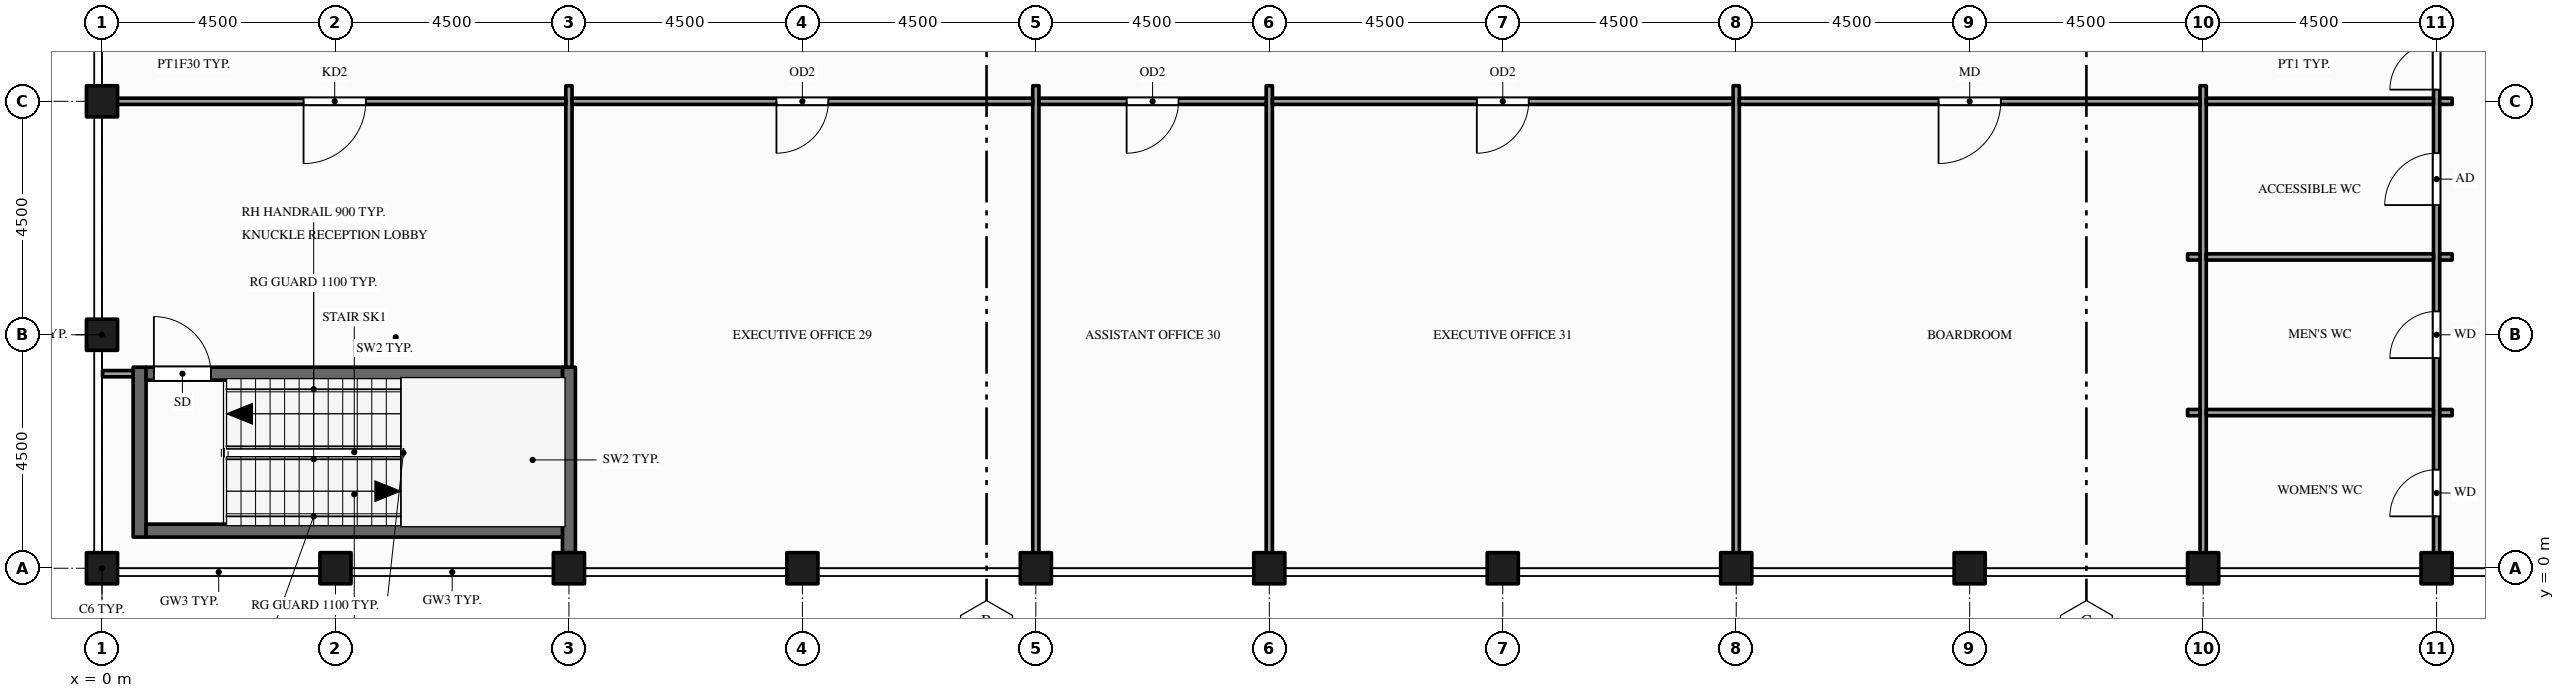
"""IFC4 building model, lengths in metres.
Left out: names, types, materials, properties, quantities, classifications, styles, units other than length and angle.
Written with IfcOpenShell. Run it as: python <this file> out.ifc"""

import sys

from ifc_helpers import new_model, si_unit, direction, frame, frame_2d, origin, origin_2d, place, context, subcontext, project, spatial, rectangle, hollow_rectangle, extrude, element, fill, save


model = new_model("IFC4")
c1 = context("Model", 3, precision=1e-05, world=origin(), true_north=direction((0.0, 1.0)))
c2 = subcontext(c1, "Body", "Model", "MODEL_VIEW")
j1 = project(units=[si_unit("LENGTHUNIT", "METRE"), si_unit("PLANEANGLEUNIT", "RADIAN")], contexts=[c1])
p1 = place(None, origin())
s1 = spatial("IfcSite", under=j1, at=p1, CompositionType="ELEMENT")
p2 = place(p1, origin())
s2 = spatial("IfcBuilding", under=s1, at=p2, CompositionType="ELEMENT")
p3 = place(p2, frame((0.0, 0.0, 314.0)))
s3 = spatial("IfcBuildingStorey", under=s2, at=p3, CompositionType="ELEMENT", Elevation=314.0)
for number, where, z_axis, x_axis in (
    (1, (0.0, 0.0, -0.15), (0.0, 0.0, 1.0), (1.0, 0.0, 0.0)),
    (2, (0.0, 4.5, -0.15), (0.0, 0.0, 1.0), (1.0, 0.0, 0.0)),
    (3, (0.0, 9.0, -0.15), (0.0, 0.0, 1.0), (1.0, 0.0, 0.0)),
    (4, (4.5, 0.0, -0.15), (0.0, 0.0, 1.0), (1.0, 0.0, 0.0)),
    (5, (9.0, 0.0, -0.15), (0.0, 0.0, 1.0), (1.0, 0.0, 0.0)),
    (6, (13.5, 0.0, -0.15), (0.0, 0.0, 1.0), (1.0, 0.0, 0.0)),
    (7, (18.0, 0.0, -0.15), (0.0, 0.0, 1.0), (1.0, 0.0, 0.0)),
    (8, (22.5, 0.0, -0.15), (0.0, 0.0, 1.0), (1.0, 0.0, 0.0)),
    (9, (27.0, 0.0, -0.15), (0.0, 0.0, 1.0), (1.0, 0.0, 0.0)),
    (10, (31.5, 0.0, -0.15), (0.0, 0.0, 1.0), (1.0, 0.0, 0.0)),
    (11, (36.0, 0.0, -0.15), (0.0, 0.0, 1.0), (1.0, 0.0, 0.0)),
    (12, (40.5, 0.0, -0.15), (0.0, 0.0, 1.0), (1.0, 0.0, 0.0)),
    (13, (45.0, 0.0, -0.15), (0.0, 0.0, 1.0), (1.0, 0.0, 0.0)),
):
    element("IfcColumn", number, at=place(p3, frame(where, z_axis=z_axis, x_axis=x_axis)), inside=s3, PredefinedType="COLUMN", context=c2, shape_type="SweptSolid", body=[
        extrude(hollow_rectangle(XDim=0.6, YDim=0.6, WallThickness=0.03, at=origin_2d()), origin(), (0.0, 0.0, 1.0), 4.5),
    ])
p4 = place(p3, frame((0.725, 0.6, 0.0), z_axis=(0.0, 0.0, 1.0), x_axis=(0.0, 1.0, 0.0)))
e14 = element("IfcWall", 14, at=p4, inside=s3, PredefinedType="SHEAR", context=c2, shape_type="SweptSolid", body=[
    extrude(rectangle(XDim=3.275, YDim=0.25, at=frame_2d((1.637, 0.0))), origin(), (0.0, 0.0, 1.0), 4.35),
])
p5 = place(p3, frame((9.0, 0.3, 0.0), z_axis=(0.0, 0.0, 1.0), x_axis=(0.0, 1.0, 0.0)))
e15 = element("IfcWall", 15, at=p5, inside=s3, PredefinedType="SHEAR", context=c2, shape_type="SweptSolid", body=[
    extrude(rectangle(XDim=3.575, YDim=0.25, at=frame_2d((1.788, 0.0))), origin(), (0.0, 0.0, 1.0), 4.35),
])
p6 = place(p3, frame((9.0, 3.875, 0.0), z_axis=(0.0, 0.0, 1.0), x_axis=(0.0, 1.0, 0.0)))
e16 = element("IfcWall", 16, at=p6, inside=s3, PredefinedType="PARTITIONING", context=c2, shape_type="SweptSolid", body=[
    extrude(rectangle(XDim=5.425, YDim=0.12, at=frame_2d((2.712, 0.0))), origin(), (0.0, 0.0, 1.0), 3.359),
])
for number, where, z_axis, x_axis in (
    (17, (18.0, 0.01, 0.0), (0.0, 0.0, 1.0), (0.0, 1.0, 0.0)),
    (18, (22.5, 0.01, 0.0), (0.0, 0.0, 1.0), (0.0, 1.0, 0.0)),
    (19, (31.5, 0.01, 0.0), (0.0, 0.0, 1.0), (0.0, 1.0, 0.0)),
    (20, (40.5, 0.01, 0.0), (0.0, 0.0, 1.0), (0.0, 1.0, 0.0)),
):
    element("IfcWall", number, at=place(p3, frame(where, z_axis=z_axis, x_axis=x_axis)), inside=s3, PredefinedType="PARTITIONING", context=c2, shape_type="SweptSolid", body=[
        extrude(rectangle(XDim=9.29, YDim=0.12, at=frame_2d((4.645, 0.0))), origin(), (0.0, 0.0, 1.0), 3.359),
    ])
p7 = place(p3, frame((45.0, 0.01, 0.0), z_axis=(0.0, 0.0, 1.0), x_axis=(0.0, 1.0, 0.0)))
e21 = element("IfcWall", 21, at=p7, inside=s3, PredefinedType="PARTITIONING", context=c2, shape_type="SweptSolid", body=[
    extrude(rectangle(XDim=22.48, YDim=0.12, at=frame_2d((11.24, 0.0))), origin(), (0.0, 0.0, 1.0), 3.359),
])
p8 = place(p7, frame((9.215, 0.0, 0.0)))
e22 = element("IfcOpeningElement", 22, at=p8, cuts=e21, PredefinedType="OPENING", context=c2, shape_type="SweptSolid", body=[
    extrude(rectangle(XDim=1.8, YDim=2.1, at=frame_2d((0.9, 1.05))), frame((0.0, 0.07, 0.0), z_axis=(0.0, -1.0, 0.0), x_axis=(1.0, 0.0, 0.0)), (0.0, 0.0, 1.0), 0.14),
])
p9 = place(p7, frame((0.99, 0.0, 0.0)))
e23 = element("IfcOpeningElement", 23, at=p9, cuts=e21, PredefinedType="OPENING", context=c2, shape_type="SweptSolid", body=[
    extrude(rectangle(XDim=0.9, YDim=2.1, at=frame_2d((0.45, 1.05))), frame((0.0, 0.07, 0.0), z_axis=(0.0, -1.0, 0.0), x_axis=(1.0, 0.0, 0.0)), (0.0, 0.0, 1.0), 0.14),
])
p10 = place(p7, frame((4.04, 0.0, 0.0)))
e24 = element("IfcOpeningElement", 24, at=p10, cuts=e21, PredefinedType="OPENING", context=c2, shape_type="SweptSolid", body=[
    extrude(rectangle(XDim=0.9, YDim=2.1, at=frame_2d((0.45, 1.05))), frame((0.0, 0.07, 0.0), z_axis=(0.0, -1.0, 0.0), x_axis=(1.0, 0.0, 0.0)), (0.0, 0.0, 1.0), 0.14),
])
p11 = place(p7, frame((6.99, 0.0, 0.0)))
e25 = element("IfcOpeningElement", 25, at=p11, cuts=e21, PredefinedType="OPENING", context=c2, shape_type="SweptSolid", body=[
    extrude(rectangle(XDim=1.0, YDim=2.1, at=frame_2d((0.5, 1.05))), frame((0.0, 0.07, 0.0), z_axis=(0.0, -1.0, 0.0), x_axis=(1.0, 0.0, 0.0)), (0.0, 0.0, 1.0), 0.14),
])
p12 = place(p3, frame((0.85, 0.725, 0.0), z_axis=(0.0, 0.0, 1.0), x_axis=(1.0, 0.0, 0.0)))
e26 = element("IfcWall", 26, at=p12, inside=s3, PredefinedType="SHEAR", context=c2, shape_type="SweptSolid", body=[
    extrude(rectangle(XDim=8.025, YDim=0.25, at=frame_2d((4.012, 0.0))), origin(), (0.0, 0.0, 1.0), 4.35),
])
p13 = place(p3, frame((40.2, 3.0, 0.0), z_axis=(0.0, 0.0, 1.0), x_axis=(1.0, 0.0, 0.0)))
e27 = element("IfcWall", 27, at=p13, inside=s3, PredefinedType="PARTITIONING", context=c2, shape_type="SweptSolid", body=[
    extrude(rectangle(XDim=0.24, YDim=0.12, at=frame_2d((0.12, 0.0))), origin(), (0.0, 0.0, 1.0), 3.359),
])
p14 = place(p3, frame((40.56, 3.0, 0.0), z_axis=(0.0, 0.0, 1.0), x_axis=(1.0, 0.0, 0.0)))
e28 = element("IfcWall", 28, at=p14, inside=s3, PredefinedType="PARTITIONING", context=c2, shape_type="SweptSolid", body=[
    extrude(rectangle(XDim=4.38, YDim=0.12, at=frame_2d((2.19, 0.0))), origin(), (0.0, 0.0, 1.0), 3.359),
])
p15 = place(p3, frame((45.06, 3.0, 0.0), z_axis=(0.0, 0.0, 1.0), x_axis=(1.0, 0.0, 0.0)))
e29 = element("IfcWall", 29, at=p15, inside=s3, PredefinedType="PARTITIONING", context=c2, shape_type="SweptSolid", body=[
    extrude(rectangle(XDim=0.24, YDim=0.12, at=frame_2d((0.12, 0.0))), origin(), (0.0, 0.0, 1.0), 3.359),
])
p16 = place(p3, frame((0.01, 3.75, 0.0), z_axis=(0.0, 0.0, 1.0), x_axis=(1.0, 0.0, 0.0)))
e30 = element("IfcWall", 30, at=p16, inside=s3, PredefinedType="PARTITIONING", context=c2, shape_type="SweptSolid", body=[
    extrude(rectangle(XDim=0.59, YDim=0.12, at=frame_2d((0.295, 0.0))), origin(), (0.0, 0.0, 1.0), 3.672),
])
p17 = place(p3, frame((0.85, 3.75, 0.0), z_axis=(0.0, 0.0, 1.0), x_axis=(1.0, 0.0, 0.0)))
e31 = element("IfcWall", 31, at=p17, inside=s3, PredefinedType="SHEAR", context=c2, shape_type="SweptSolid", body=[
    extrude(rectangle(XDim=8.025, YDim=0.25, at=frame_2d((4.012, 0.0))), origin(), (0.0, 0.0, 1.0), 4.35),
])
p18 = place(p17, frame((0.15, 0.0, 0.0)))
e32 = element("IfcOpeningElement", 32, at=p18, cuts=e31, PredefinedType="OPENING", context=c2, shape_type="SweptSolid", body=[
    extrude(rectangle(XDim=1.1, YDim=2.1, at=frame_2d((0.55, 1.05))), frame((0.0, 0.135, 0.0), z_axis=(0.0, -1.0, 0.0), x_axis=(1.0, 0.0, 0.0)), (0.0, 0.0, 1.0), 0.27),
])
p19 = place(p3, frame((40.2, 6.0, 0.0), z_axis=(0.0, 0.0, 1.0), x_axis=(1.0, 0.0, 0.0)))
e33 = element("IfcWall", 33, at=p19, inside=s3, PredefinedType="PARTITIONING", context=c2, shape_type="SweptSolid", body=[
    extrude(rectangle(XDim=0.24, YDim=0.12, at=frame_2d((0.12, 0.0))), origin(), (0.0, 0.0, 1.0), 3.359),
])
p20 = place(p3, frame((40.56, 6.0, 0.0), z_axis=(0.0, 0.0, 1.0), x_axis=(1.0, 0.0, 0.0)))
e34 = element("IfcWall", 34, at=p20, inside=s3, PredefinedType="PARTITIONING", context=c2, shape_type="SweptSolid", body=[
    extrude(rectangle(XDim=4.38, YDim=0.12, at=frame_2d((2.19, 0.0))), origin(), (0.0, 0.0, 1.0), 3.359),
])
p21 = place(p3, frame((45.06, 6.0, 0.0), z_axis=(0.0, 0.0, 1.0), x_axis=(1.0, 0.0, 0.0)))
e35 = element("IfcWall", 35, at=p21, inside=s3, PredefinedType="PARTITIONING", context=c2, shape_type="SweptSolid", body=[
    extrude(rectangle(XDim=0.24, YDim=0.12, at=frame_2d((0.12, 0.0))), origin(), (0.0, 0.0, 1.0), 3.359),
])
p22 = place(p3, frame((0.01, 9.0, 0.0), z_axis=(0.0, 0.0, 1.0), x_axis=(1.0, 0.0, 0.0)))
e36 = element("IfcWall", 36, at=p22, inside=s3, PredefinedType="PARTITIONING", context=c2, shape_type="SweptSolid", body=[
    extrude(rectangle(XDim=8.93, YDim=0.12, at=frame_2d((4.465, 0.0))), origin(), (0.0, 0.0, 1.0), 3.359),
])
p23 = place(p22, frame((3.875, 0.0, 0.0)))
e37 = element("IfcOpeningElement", 37, at=p23, cuts=e36, PredefinedType="OPENING", context=c2, shape_type="SweptSolid", body=[
    extrude(rectangle(XDim=1.2, YDim=2.1, at=frame_2d((0.6, 1.05))), frame((0.0, 0.07, 0.0), z_axis=(0.0, -1.0, 0.0), x_axis=(1.0, 0.0, 0.0)), (0.0, 0.0, 1.0), 0.14),
])
p24 = place(p3, frame((9.06, 9.0, 0.0), z_axis=(0.0, 0.0, 1.0), x_axis=(1.0, 0.0, 0.0)))
e38 = element("IfcWall", 38, at=p24, inside=s3, PredefinedType="PARTITIONING", context=c2, shape_type="SweptSolid", body=[
    extrude(rectangle(XDim=8.88, YDim=0.12, at=frame_2d((4.44, 0.0))), origin(), (0.0, 0.0, 1.0), 3.359),
])
p25 = place(p24, frame((3.94, 0.0, 0.0)))
e39 = element("IfcOpeningElement", 39, at=p25, cuts=e38, PredefinedType="OPENING", context=c2, shape_type="SweptSolid", body=[
    extrude(rectangle(XDim=1.0, YDim=2.1, at=frame_2d((0.5, 1.05))), frame((0.0, 0.07, 0.0), z_axis=(0.0, -1.0, 0.0), x_axis=(1.0, 0.0, 0.0)), (0.0, 0.0, 1.0), 0.14),
])
p26 = place(p3, frame((18.06, 9.0, 0.0), z_axis=(0.0, 0.0, 1.0), x_axis=(1.0, 0.0, 0.0)))
e40 = element("IfcWall", 40, at=p26, inside=s3, PredefinedType="PARTITIONING", context=c2, shape_type="SweptSolid", body=[
    extrude(rectangle(XDim=4.38, YDim=0.12, at=frame_2d((2.19, 0.0))), origin(), (0.0, 0.0, 1.0), 3.359),
])
p27 = place(p26, frame((1.69, 0.0, 0.0)))
e41 = element("IfcOpeningElement", 41, at=p27, cuts=e40, PredefinedType="OPENING", context=c2, shape_type="SweptSolid", body=[
    extrude(rectangle(XDim=1.0, YDim=2.1, at=frame_2d((0.5, 1.05))), frame((0.0, 0.07, 0.0), z_axis=(0.0, -1.0, 0.0), x_axis=(1.0, 0.0, 0.0)), (0.0, 0.0, 1.0), 0.14),
])
p28 = place(p3, frame((22.56, 9.0, 0.0), z_axis=(0.0, 0.0, 1.0), x_axis=(1.0, 0.0, 0.0)))
e42 = element("IfcWall", 42, at=p28, inside=s3, PredefinedType="PARTITIONING", context=c2, shape_type="SweptSolid", body=[
    extrude(rectangle(XDim=8.88, YDim=0.12, at=frame_2d((4.44, 0.0))), origin(), (0.0, 0.0, 1.0), 3.359),
])
p29 = place(p28, frame((3.94, 0.0, 0.0)))
e43 = element("IfcOpeningElement", 43, at=p29, cuts=e42, PredefinedType="OPENING", context=c2, shape_type="SweptSolid", body=[
    extrude(rectangle(XDim=1.0, YDim=2.1, at=frame_2d((0.5, 1.05))), frame((0.0, 0.07, 0.0), z_axis=(0.0, -1.0, 0.0), x_axis=(1.0, 0.0, 0.0)), (0.0, 0.0, 1.0), 0.14),
])
p30 = place(p3, frame((31.56, 9.0, 0.0), z_axis=(0.0, 0.0, 1.0), x_axis=(1.0, 0.0, 0.0)))
e44 = element("IfcWall", 44, at=p30, inside=s3, PredefinedType="PARTITIONING", context=c2, shape_type="SweptSolid", body=[
    extrude(rectangle(XDim=8.88, YDim=0.12, at=frame_2d((4.44, 0.0))), origin(), (0.0, 0.0, 1.0), 3.359),
])
p31 = place(p30, frame((3.84, 0.0, 0.0)))
e45 = element("IfcOpeningElement", 45, at=p31, cuts=e44, PredefinedType="OPENING", context=c2, shape_type="SweptSolid", body=[
    extrude(rectangle(XDim=1.2, YDim=2.1, at=frame_2d((0.6, 1.05))), frame((0.0, 0.07, 0.0), z_axis=(0.0, -1.0, 0.0), x_axis=(1.0, 0.0, 0.0)), (0.0, 0.0, 1.0), 0.14),
])
p32 = place(p3, frame((40.56, 9.0, 0.0), z_axis=(0.0, 0.0, 1.0), x_axis=(1.0, 0.0, 0.0)))
e46 = element("IfcWall", 46, at=p32, inside=s3, PredefinedType="PARTITIONING", context=c2, shape_type="SweptSolid", body=[
    extrude(rectangle(XDim=4.38, YDim=0.12, at=frame_2d((2.19, 0.0))), origin(), (0.0, 0.0, 1.0), 3.359),
])
p33 = place(p3, frame((45.06, 9.0, 0.0), z_axis=(0.0, 0.0, 1.0), x_axis=(1.0, 0.0, 0.0)))
e47 = element("IfcWall", 47, at=p33, inside=s3, PredefinedType="PARTITIONING", context=c2, shape_type="SweptSolid", body=[
    extrude(rectangle(XDim=0.24, YDim=0.12, at=frame_2d((0.12, 0.0))), origin(), (0.0, 0.0, 1.0), 3.359),
])
p34 = place(p8, origin())
e48 = element("IfcDoor", 48, at=p34, inside=s3, OperationType="DOUBLE_DOOR_SINGLE_SWING", PredefinedType="DOOR", context=c2, shape_type="SweptSolid", body=[
    extrude(rectangle(XDim=1.8, YDim=2.1, at=frame_2d((0.9, 1.05))), frame((0.0, 0.025, 0.0), z_axis=(0.0, -1.0, 0.0), x_axis=(1.0, 0.0, 0.0)), (0.0, 0.0, 1.0), 0.05),
])
fill(e22, e48)
p35 = place(p18, origin())
e49 = element("IfcDoor", 49, at=p35, inside=s3, OperationType="SINGLE_SWING_LEFT", PredefinedType="DOOR", context=c2, shape_type="SweptSolid", body=[
    extrude(rectangle(XDim=1.1, YDim=2.1, at=frame_2d((0.55, 1.05))), frame((0.0, 0.025, 0.0), z_axis=(0.0, -1.0, 0.0), x_axis=(1.0, 0.0, 0.0)), (0.0, 0.0, 1.0), 0.05),
])
fill(e32, e49)
p36 = place(p23, origin())
e50 = element("IfcDoor", 50, at=p36, inside=s3, OperationType="SINGLE_SWING_LEFT", PredefinedType="DOOR", context=c2, shape_type="SweptSolid", body=[
    extrude(rectangle(XDim=1.2, YDim=2.1, at=frame_2d((0.6, 1.05))), frame((0.0, 0.025, 0.0), z_axis=(0.0, -1.0, 0.0), x_axis=(1.0, 0.0, 0.0)), (0.0, 0.0, 1.0), 0.05),
])
fill(e37, e50)
p37 = place(p25, origin())
e51 = element("IfcDoor", 51, at=p37, inside=s3, OperationType="SINGLE_SWING_LEFT", PredefinedType="DOOR", context=c2, shape_type="SweptSolid", body=[
    extrude(rectangle(XDim=1.0, YDim=2.1, at=frame_2d((0.5, 1.05))), frame((0.0, 0.025, 0.0), z_axis=(0.0, -1.0, 0.0), x_axis=(1.0, 0.0, 0.0)), (0.0, 0.0, 1.0), 0.05),
])
fill(e39, e51)
p38 = place(p27, origin())
e52 = element("IfcDoor", 52, at=p38, inside=s3, OperationType="SINGLE_SWING_LEFT", PredefinedType="DOOR", context=c2, shape_type="SweptSolid", body=[
    extrude(rectangle(XDim=1.0, YDim=2.1, at=frame_2d((0.5, 1.05))), frame((0.0, 0.025, 0.0), z_axis=(0.0, -1.0, 0.0), x_axis=(1.0, 0.0, 0.0)), (0.0, 0.0, 1.0), 0.05),
])
fill(e41, e52)
p39 = place(p29, origin())
e53 = element("IfcDoor", 53, at=p39, inside=s3, OperationType="SINGLE_SWING_LEFT", PredefinedType="DOOR", context=c2, shape_type="SweptSolid", body=[
    extrude(rectangle(XDim=1.0, YDim=2.1, at=frame_2d((0.5, 1.05))), frame((0.0, 0.025, 0.0), z_axis=(0.0, -1.0, 0.0), x_axis=(1.0, 0.0, 0.0)), (0.0, 0.0, 1.0), 0.05),
])
fill(e43, e53)
p40 = place(p31, origin())
e54 = element("IfcDoor", 54, at=p40, inside=s3, OperationType="SINGLE_SWING_LEFT", PredefinedType="DOOR", context=c2, shape_type="SweptSolid", body=[
    extrude(rectangle(XDim=1.2, YDim=2.1, at=frame_2d((0.6, 1.05))), frame((0.0, 0.025, 0.0), z_axis=(0.0, -1.0, 0.0), x_axis=(1.0, 0.0, 0.0)), (0.0, 0.0, 1.0), 0.05),
])
fill(e45, e54)
p41 = place(p9, origin())
e55 = element("IfcDoor", 55, at=p41, inside=s3, OperationType="SINGLE_SWING_LEFT", PredefinedType="DOOR", context=c2, shape_type="SweptSolid", body=[
    extrude(rectangle(XDim=0.9, YDim=2.1, at=frame_2d((0.45, 1.05))), frame((0.0, 0.025, 0.0), z_axis=(0.0, -1.0, 0.0), x_axis=(1.0, 0.0, 0.0)), (0.0, 0.0, 1.0), 0.05),
])
fill(e23, e55)
p42 = place(p10, origin())
e56 = element("IfcDoor", 56, at=p42, inside=s3, OperationType="SINGLE_SWING_LEFT", PredefinedType="DOOR", context=c2, shape_type="SweptSolid", body=[
    extrude(rectangle(XDim=0.9, YDim=2.1, at=frame_2d((0.45, 1.05))), frame((0.0, 0.025, 0.0), z_axis=(0.0, -1.0, 0.0), x_axis=(1.0, 0.0, 0.0)), (0.0, 0.0, 1.0), 0.05),
])
fill(e24, e56)
p43 = place(p11, origin())
e57 = element("IfcDoor", 57, at=p43, inside=s3, OperationType="SINGLE_SWING_LEFT", PredefinedType="DOOR", context=c2, shape_type="SweptSolid", body=[
    extrude(rectangle(XDim=1.0, YDim=2.1, at=frame_2d((0.5, 1.05))), frame((0.0, 0.025, 0.0), z_axis=(0.0, -1.0, 0.0), x_axis=(1.0, 0.0, 0.0)), (0.0, 0.0, 1.0), 0.05),
])
fill(e25, e57)
save(model, sys.argv[1])
